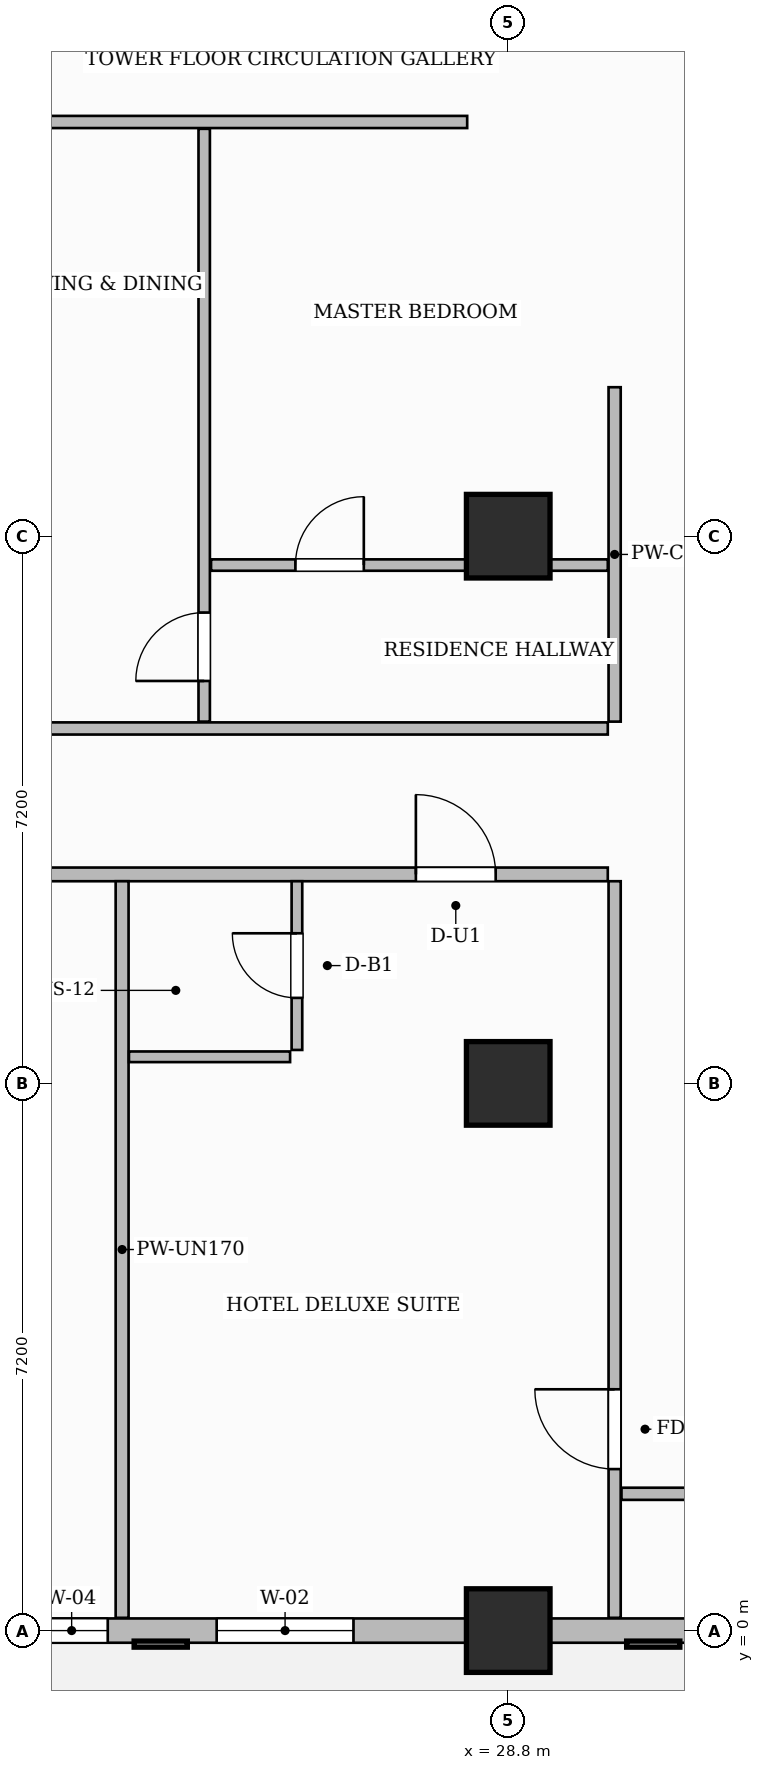
"""IFC4 building model, lengths in metres.
Left out: names, types, materials, properties, quantities, classifications, styles, units other than length and angle.
Written with IfcOpenShell. Run it as: python <this file> out.ifc"""

import sys

from ifc_helpers import new_model, si_unit, direction, frame, frame_2d, origin, origin_2d, place, context, subcontext, project, spatial, rectangle, extrude, source, transform, mapped, element, fill, save


model = new_model("IFC4")
c1 = context("Model", 3, precision=1e-05, world=origin(), true_north=direction((0.0, 1.0)))
c2 = subcontext(c1, "Body", "Model", "MODEL_VIEW")
j1 = project(units=[si_unit("LENGTHUNIT", "METRE"), si_unit("PLANEANGLEUNIT", "RADIAN")], contexts=[c1])
p1 = place(None, origin())
s1 = spatial("IfcSite", under=j1, at=p1, CompositionType="ELEMENT")
p2 = place(p1, origin())
s2 = spatial("IfcBuilding", under=s1, at=p2, CompositionType="ELEMENT")
p3 = place(p2, frame((0.0, 0.0, 84.2)))
s3 = spatial("IfcBuildingStorey", under=s2, at=p3, CompositionType="ELEMENT", Elevation=84.2)
m1 = source(origin(), c2, "Body", "SweptSolid", [
    extrude(rectangle(XDim=1.1, YDim=1.1, at=origin_2d()), origin(), (0.0, 0.0, 1.0), 3.7),
])
for number, where, z_axis, x_axis in (
    (1, (28.8, 0.0, 0.0), (0.0, 0.0, 1.0), (1.0, 0.0, 0.0)),
    (2, (28.8, 7.2, 0.0), (0.0, 0.0, 1.0), (1.0, 0.0, 0.0)),
    (3, (28.8, 14.4, 0.0), (0.0, 0.0, 1.0), (1.0, 0.0, 0.0)),
):
    element("IfcColumn", number, at=place(p3, frame(where, z_axis=z_axis, x_axis=x_axis)), inside=s3, PredefinedType="COLUMN", context=c2, shape_type="MappedRepresentation", body=[
        mapped(m1, transform((0.0, 0.0, 0.0), scale=1.0)),
    ])
p4 = place(p3, frame((14.568, 9.95, 0.0), z_axis=(0.0, 0.0, 1.0), x_axis=(1.0, 0.0, 0.0)))
e4 = element("IfcWall", 4, at=p4, inside=s3, PredefinedType="PARTITIONING", context=c2, shape_type="SweptSolid", body=[
    extrude(rectangle(XDim=15.542, YDim=0.18, at=frame_2d((7.771, 0.0))), origin(), (0.0, 0.0, 1.0), 3.45),
])
p5 = place(p4, frame((5.142, 0.0, 0.0)))
e5 = element("IfcOpeningElement", 5, at=p5, cuts=e4, PredefinedType="OPENING", context=c2, shape_type="SweptSolid", body=[
    extrude(rectangle(XDim=1.0, YDim=2.2, at=frame_2d((0.5, 1.1))), frame((0.0, 0.1, 0.0), z_axis=(0.0, -1.0, 0.0), x_axis=(1.0, 0.0, 0.0)), (0.0, 0.0, 1.0), 0.2),
])
p6 = place(p4, frame((13.017, 0.0, 0.0)))
e6 = element("IfcOpeningElement", 6, at=p6, cuts=e4, PredefinedType="OPENING", context=c2, shape_type="SweptSolid", body=[
    extrude(rectangle(XDim=1.05, YDim=2.25, at=frame_2d((0.525, 1.125))), frame((0.0, 0.1, 0.0), z_axis=(0.0, -1.0, 0.0), x_axis=(1.0, 0.0, 0.0)), (0.0, 0.0, 1.0), 0.2),
])
p7 = place(p3, frame((14.568, 11.87, 0.0), z_axis=(0.0, 0.0, 1.0), x_axis=(1.0, 0.0, 0.0)))
e7 = element("IfcWall", 7, at=p7, inside=s3, PredefinedType="PARTITIONING", context=c2, shape_type="SweptSolid", body=[
    extrude(rectangle(XDim=15.542, YDim=0.16, at=frame_2d((7.771, 0.0))), origin(), (0.0, 0.0, 1.0), 3.45),
])
p8 = place(p7, frame((7.122, 0.0, 0.0)))
e8 = element("IfcOpeningElement", 8, at=p8, cuts=e7, PredefinedType="OPENING", context=c2, shape_type="SweptSolid", body=[
    extrude(rectangle(XDim=1.05, YDim=2.25, at=frame_2d((0.525, 1.125))), frame((0.0, 0.09, 0.0), z_axis=(0.0, -1.0, 0.0), x_axis=(1.0, 0.0, 0.0)), (0.0, 0.0, 1.0), 0.18),
])
p9 = place(p3, frame((30.2, 11.96, 0.0), z_axis=(0.0, 0.0, 1.0), x_axis=(0.0, 1.0, 0.0)))
e9 = element("IfcWall", 9, at=p9, inside=s3, PredefinedType="PARTITIONING", context=c2, shape_type="SweptSolid", body=[
    extrude(rectangle(XDim=4.4, YDim=0.16, at=frame_2d((2.2, 0.0))), origin(), (0.0, 0.0, 1.0), 3.45),
])
p10 = place(p3, frame((30.2, 0.168, 0.0), z_axis=(0.0, 0.0, 1.0), x_axis=(0.0, 1.0, 0.0)))
e10 = element("IfcWall", 10, at=p10, inside=s3, PredefinedType="PARTITIONING", context=c2, shape_type="SweptSolid", body=[
    extrude(rectangle(XDim=9.692, YDim=0.16, at=frame_2d((4.846, 0.0))), origin(), (0.0, 0.0, 1.0), 3.45),
])
p11 = place(p10, frame((1.957, 0.0, 0.0)))
e11 = element("IfcOpeningElement", 11, at=p11, cuts=e10, PredefinedType="OPENING", context=c2, shape_type="SweptSolid", body=[
    extrude(rectangle(XDim=1.05, YDim=2.15, at=frame_2d((0.525, 1.075))), frame((0.0, 0.09, 0.0), z_axis=(0.0, -1.0, 0.0), x_axis=(1.0, 0.0, 0.0)), (0.0, 0.0, 1.0), 0.18),
])
p12 = place(p3, frame((30.29, 1.8, 0.0), z_axis=(0.0, 0.0, 1.0), x_axis=(1.0, 0.0, 0.0)))
e12 = element("IfcWall", 12, at=p12, inside=s3, PredefinedType="PARTITIONING", context=c2, shape_type="SweptSolid", body=[
    extrude(rectangle(XDim=19.37, YDim=0.16, at=frame_2d((9.685, 0.0))), origin(), (0.0, 0.0, 1.0), 3.45),
])
p13 = place(p12, frame((9.735, 0.0, 0.0)))
e13 = element("IfcOpeningElement", 13, at=p13, cuts=e12, PredefinedType="OPENING", context=c2, shape_type="SweptSolid", body=[
    extrude(rectangle(XDim=0.95, YDim=2.15, at=frame_2d((0.475, 1.075))), frame((0.0, 0.09, 0.0), z_axis=(0.0, -1.0, 0.0), x_axis=(1.0, 0.0, 0.0)), (0.0, 0.0, 1.0), 0.18),
])
p14 = place(p3, frame((23.72, 0.168, 0.0), z_axis=(0.0, 0.0, 1.0), x_axis=(0.0, 1.0, 0.0)))
e14 = element("IfcWall", 14, at=p14, inside=s3, PredefinedType="PARTITIONING", context=c2, shape_type="SweptSolid", body=[
    extrude(rectangle(XDim=9.692, YDim=0.17, at=frame_2d((4.846, 0.0))), origin(), (0.0, 0.0, 1.0), 3.45),
])
p15 = place(p3, frame((26.02, 7.64, 0.0), z_axis=(0.0, 0.0, 1.0), x_axis=(0.0, 1.0, 0.0)))
e15 = element("IfcWall", 15, at=p15, inside=s3, PredefinedType="PARTITIONING", context=c2, shape_type="SweptSolid", body=[
    extrude(rectangle(XDim=2.22, YDim=0.14, at=frame_2d((1.11, 0.0))), origin(), (0.0, 0.0, 1.0), 3.45),
])
p16 = place(p15, frame((0.685, 0.0, 0.0)))
e16 = element("IfcOpeningElement", 16, at=p16, cuts=e15, PredefinedType="OPENING", context=c2, shape_type="SweptSolid", body=[
    extrude(rectangle(XDim=0.85, YDim=2.1, at=frame_2d((0.425, 1.05))), frame((0.0, 0.08, 0.0), z_axis=(0.0, -1.0, 0.0), x_axis=(1.0, 0.0, 0.0)), (0.0, 0.0, 1.0), 0.16),
])
p17 = place(p3, frame((23.81, 7.55, 0.0), z_axis=(0.0, 0.0, 1.0), x_axis=(1.0, 0.0, 0.0)))
e17 = element("IfcWall", 17, at=p17, inside=s3, PredefinedType="PARTITIONING", context=c2, shape_type="SweptSolid", body=[
    extrude(rectangle(XDim=2.12, YDim=0.14, at=frame_2d((1.06, 0.0))), origin(), (0.0, 0.0, 1.0), 3.45),
])
p18 = place(p3, frame((17.34, 19.85, 0.0), z_axis=(0.0, 0.0, 1.0), x_axis=(1.0, 0.0, 0.0)))
e18 = element("IfcWall", 18, at=p18, inside=s3, PredefinedType="PARTITIONING", context=c2, shape_type="SweptSolid", body=[
    extrude(rectangle(XDim=10.92, YDim=0.16, at=frame_2d((5.46, 0.0))), origin(), (0.0, 0.0, 1.0), 3.45),
])
p19 = place(p3, frame((24.8, 11.96, 0.0), z_axis=(0.0, 0.0, 1.0), x_axis=(0.0, 1.0, 0.0)))
e19 = element("IfcWall", 19, at=p19, inside=s3, PredefinedType="PARTITIONING", context=c2, shape_type="SweptSolid", body=[
    extrude(rectangle(XDim=7.8, YDim=0.15, at=frame_2d((3.9, 0.0))), origin(), (0.0, 0.0, 1.0), 3.45),
])
p20 = place(p19, frame((0.535, 0.0, 0.0)))
e20 = element("IfcOpeningElement", 20, at=p20, cuts=e19, PredefinedType="OPENING", context=c2, shape_type="SweptSolid", body=[
    extrude(rectangle(XDim=0.9, YDim=2.15, at=frame_2d((0.45, 1.075))), frame((0.0, 0.085, 0.0), z_axis=(0.0, -1.0, 0.0), x_axis=(1.0, 0.0, 0.0)), (0.0, 0.0, 1.0), 0.17),
])
p21 = place(p3, frame((24.89, 14.02, 0.0), z_axis=(0.0, 0.0, 1.0), x_axis=(1.0, 0.0, 0.0)))
e21 = element("IfcWall", 21, at=p21, inside=s3, PredefinedType="PARTITIONING", context=c2, shape_type="SweptSolid", body=[
    extrude(rectangle(XDim=5.22, YDim=0.15, at=frame_2d((2.61, 0.0))), origin(), (0.0, 0.0, 1.0), 3.45),
])
p22 = place(p21, frame((1.11, 0.0, 0.0)))
e22 = element("IfcOpeningElement", 22, at=p22, cuts=e21, PredefinedType="OPENING", context=c2, shape_type="SweptSolid", body=[
    extrude(rectangle(XDim=0.9, YDim=2.15, at=frame_2d((0.45, 1.075))), frame((0.0, 0.085, 0.0), z_axis=(0.0, -1.0, 0.0), x_axis=(1.0, 0.0, 0.0)), (0.0, 0.0, 1.0), 0.17),
])
p23 = place(p3, frame((14.4, 0.0, 0.0), z_axis=(0.0, 0.0, 1.0), x_axis=(1.0, 0.0, 0.0)))
e23 = element("IfcWall", 23, at=p23, inside=s3, PredefinedType="SOLIDWALL", context=c2, shape_type="SweptSolid", body=[
    extrude(rectangle(XDim=43.2, YDim=0.32, at=frame_2d((21.6, 0.0))), origin(), (0.0, 0.0, 1.0), 2.885),
])
p24 = place(p23, frame((0.85, 0.0, 0.0)))
e24 = element("IfcOpeningElement", 24, at=p24, cuts=e23, PredefinedType="OPENING", context=c2, shape_type="SweptSolid", body=[
    extrude(rectangle(XDim=1.2, YDim=2.2, at=frame_2d((0.6, 1.1))), frame((0.0, 0.17, 0.0), z_axis=(0.0, -1.0, 0.0), x_axis=(1.0, 0.0, 0.0)), (0.0, 0.0, 1.0), 0.34),
])
p25 = place(p23, frame((3.475, 0.0, 0.8)))
e25 = element("IfcOpeningElement", 25, at=p25, cuts=e23, PredefinedType="OPENING", context=c2, shape_type="SweptSolid", body=[
    extrude(rectangle(XDim=1.8, YDim=1.85, at=frame_2d((0.9, 0.925))), frame((0.0, 0.17, 0.0), z_axis=(0.0, -1.0, 0.0), x_axis=(1.0, 0.0, 0.0)), (0.0, 0.0, 1.0), 0.34),
])
p26 = place(p23, frame((8.181, 0.0, 0.8)))
e26 = element("IfcOpeningElement", 26, at=p26, cuts=e23, PredefinedType="OPENING", context=c2, shape_type="SweptSolid", body=[
    extrude(rectangle(XDim=0.95, YDim=1.75, at=frame_2d((0.475, 0.875))), frame((0.0, 0.17, 0.0), z_axis=(0.0, -1.0, 0.0), x_axis=(1.0, 0.0, 0.0)), (0.0, 0.0, 1.0), 0.34),
])
p27 = place(p23, frame((10.564, 0.0, 0.8)))
e27 = element("IfcOpeningElement", 27, at=p27, cuts=e23, PredefinedType="OPENING", context=c2, shape_type="SweptSolid", body=[
    extrude(rectangle(XDim=1.8, YDim=1.85, at=frame_2d((0.9, 0.925))), frame((0.0, 0.17, 0.0), z_axis=(0.0, -1.0, 0.0), x_axis=(1.0, 0.0, 0.0)), (0.0, 0.0, 1.0), 0.34),
])
p28 = place(p23, frame((16.804, 0.0, 0.8)))
e28 = element("IfcOpeningElement", 28, at=p28, cuts=e23, PredefinedType="OPENING", context=c2, shape_type="SweptSolid", body=[
    extrude(rectangle(XDim=1.8, YDim=1.85, at=frame_2d((0.9, 0.925))), frame((0.0, 0.17, 0.0), z_axis=(0.0, -1.0, 0.0), x_axis=(1.0, 0.0, 0.0)), (0.0, 0.0, 1.0), 0.34),
])
p29 = place(p23, frame((21.725, 0.0, 0.8)))
e29 = element("IfcOpeningElement", 29, at=p29, cuts=e23, PredefinedType="OPENING", context=c2, shape_type="SweptSolid", body=[
    extrude(rectangle(XDim=1.8, YDim=1.85, at=frame_2d((0.9, 0.925))), frame((0.0, 0.17, 0.0), z_axis=(0.0, -1.0, 0.0), x_axis=(1.0, 0.0, 0.0)), (0.0, 0.0, 1.0), 0.34),
])
p30 = place(p23, frame((24.475, 0.0, 0.8)))
e30 = element("IfcOpeningElement", 30, at=p30, cuts=e23, PredefinedType="OPENING", context=c2, shape_type="SweptSolid", body=[
    extrude(rectangle(XDim=1.8, YDim=1.85, at=frame_2d((0.9, 0.925))), frame((0.0, 0.17, 0.0), z_axis=(0.0, -1.0, 0.0), x_axis=(1.0, 0.0, 0.0)), (0.0, 0.0, 1.0), 0.34),
])
p31 = place(p23, frame((29.075, 0.0, 0.8)))
e31 = element("IfcOpeningElement", 31, at=p31, cuts=e23, PredefinedType="OPENING", context=c2, shape_type="SweptSolid", body=[
    extrude(rectangle(XDim=1.8, YDim=1.85, at=frame_2d((0.9, 0.925))), frame((0.0, 0.17, 0.0), z_axis=(0.0, -1.0, 0.0), x_axis=(1.0, 0.0, 0.0)), (0.0, 0.0, 1.0), 0.34),
])
p32 = place(p23, frame((32.125, 0.0, 0.8)))
e32 = element("IfcOpeningElement", 32, at=p32, cuts=e23, PredefinedType="OPENING", context=c2, shape_type="SweptSolid", body=[
    extrude(rectangle(XDim=1.8, YDim=1.85, at=frame_2d((0.9, 0.925))), frame((0.0, 0.17, 0.0), z_axis=(0.0, -1.0, 0.0), x_axis=(1.0, 0.0, 0.0)), (0.0, 0.0, 1.0), 0.34),
])
p33 = place(p23, frame((36.875, 0.0, 0.8)))
e33 = element("IfcOpeningElement", 33, at=p33, cuts=e23, PredefinedType="OPENING", context=c2, shape_type="SweptSolid", body=[
    extrude(rectangle(XDim=1.8, YDim=1.85, at=frame_2d((0.9, 0.925))), frame((0.0, 0.17, 0.0), z_axis=(0.0, -1.0, 0.0), x_axis=(1.0, 0.0, 0.0)), (0.0, 0.0, 1.0), 0.34),
])
p34 = place(p23, frame((39.925, 0.0, 0.8)))
e34 = element("IfcOpeningElement", 34, at=p34, cuts=e23, PredefinedType="OPENING", context=c2, shape_type="SweptSolid", body=[
    extrude(rectangle(XDim=1.8, YDim=1.85, at=frame_2d((0.9, 0.925))), frame((0.0, 0.17, 0.0), z_axis=(0.0, -1.0, 0.0), x_axis=(1.0, 0.0, 0.0)), (0.0, 0.0, 1.0), 0.34),
])
m2 = source(origin(), c2, "Body", "SweptSolid", [
    extrude(rectangle(XDim=1.05, YDim=2.15, at=frame_2d((0.525, 1.075))), frame((0.0, 0.025, 0.0), z_axis=(0.0, -1.0, 0.0), x_axis=(1.0, 0.0, 0.0)), (0.0, 0.0, 1.0), 0.05),
])
p35 = place(p11, origin())
e35 = element("IfcDoor", 35, at=p35, inside=s3, OperationType="SINGLE_SWING_RIGHT", PredefinedType="DOOR", context=c2, shape_type="MappedRepresentation", body=[
    mapped(m2, transform((0.0, 0.0, 0.0), scale=1.0)),
])
fill(e11, e35)
m3 = source(origin(), c2, "Body", "SweptSolid", [
    extrude(rectangle(XDim=0.85, YDim=2.1, at=frame_2d((0.425, 1.05))), frame((0.0, 0.025, 0.0), z_axis=(0.0, -1.0, 0.0), x_axis=(1.0, 0.0, 0.0)), (0.0, 0.0, 1.0), 0.05),
])
p36 = place(p16, origin())
e36 = element("IfcDoor", 36, at=p36, inside=s3, OperationType="SINGLE_SWING_RIGHT", PredefinedType="DOOR", context=c2, shape_type="MappedRepresentation", body=[
    mapped(m3, transform((0.0, 0.0, 0.0), scale=1.0)),
])
fill(e16, e36)
m4 = source(origin(), c2, "Body", "SweptSolid", [
    extrude(rectangle(XDim=1.05, YDim=2.25, at=frame_2d((0.525, 1.125))), frame((0.0, 0.025, 0.0), z_axis=(0.0, -1.0, 0.0), x_axis=(1.0, 0.0, 0.0)), (0.0, 0.0, 1.0), 0.05),
])
p37 = place(p6, origin())
e37 = element("IfcDoor", 37, at=p37, inside=s3, OperationType="SINGLE_SWING_LEFT", PredefinedType="DOOR", context=c2, shape_type="MappedRepresentation", body=[
    mapped(m4, transform((0.0, 0.0, 0.0), scale=1.0)),
])
fill(e6, e37)
m5 = source(origin(), c2, "Body", "SweptSolid", [
    extrude(rectangle(XDim=0.9, YDim=2.15, at=frame_2d((0.45, 1.075))), frame((0.0, 0.025, 0.0), z_axis=(0.0, -1.0, 0.0), x_axis=(1.0, 0.0, 0.0)), (0.0, 0.0, 1.0), 0.05),
])
p38 = place(p20, origin())
e38 = element("IfcDoor", 38, at=p38, inside=s3, OperationType="SINGLE_SWING_LEFT", PredefinedType="DOOR", context=c2, shape_type="MappedRepresentation", body=[
    mapped(m5, transform((0.0, 0.0, 0.0), scale=1.0)),
])
fill(e20, e38)
p39 = place(p22, origin())
e39 = element("IfcDoor", 39, at=p39, inside=s3, OperationType="SINGLE_SWING_RIGHT", PredefinedType="DOOR", context=c2, shape_type="MappedRepresentation", body=[
    mapped(m5, transform((0.0, 0.0, 0.0), scale=1.0)),
])
fill(e22, e39)
m6 = source(origin(), c2, "Body", "SweptSolid", [
    extrude(rectangle(XDim=0.95, YDim=1.75, at=frame_2d((0.475, 0.875))), frame((0.0, 0.03, 0.0), z_axis=(0.0, -1.0, 0.0), x_axis=(1.0, 0.0, 0.0)), (0.0, 0.0, 1.0), 0.06),
])
p40 = place(p26, origin())
e40 = element("IfcWindow", 40, at=p40, inside=s3, PartitioningType="SINGLE_PANEL", PredefinedType="WINDOW", context=c2, shape_type="MappedRepresentation", body=[
    mapped(m6, transform((0.0, 0.0, 0.0), scale=1.0)),
])
fill(e26, e40)
m7 = source(origin(), c2, "Body", "SweptSolid", [
    extrude(rectangle(XDim=1.8, YDim=1.85, at=frame_2d((0.9, 0.925))), frame((0.0, 0.03, 0.0), z_axis=(0.0, -1.0, 0.0), x_axis=(1.0, 0.0, 0.0)), (0.0, 0.0, 1.0), 0.06),
])
p41 = place(p27, origin())
e41 = element("IfcWindow", 41, at=p41, inside=s3, PartitioningType="DOUBLE_PANEL_VERTICAL", PredefinedType="WINDOW", context=c2, shape_type="MappedRepresentation", body=[
    mapped(m7, transform((0.0, 0.0, 0.0), scale=1.0)),
])
fill(e27, e41)
save(model, sys.argv[1])
